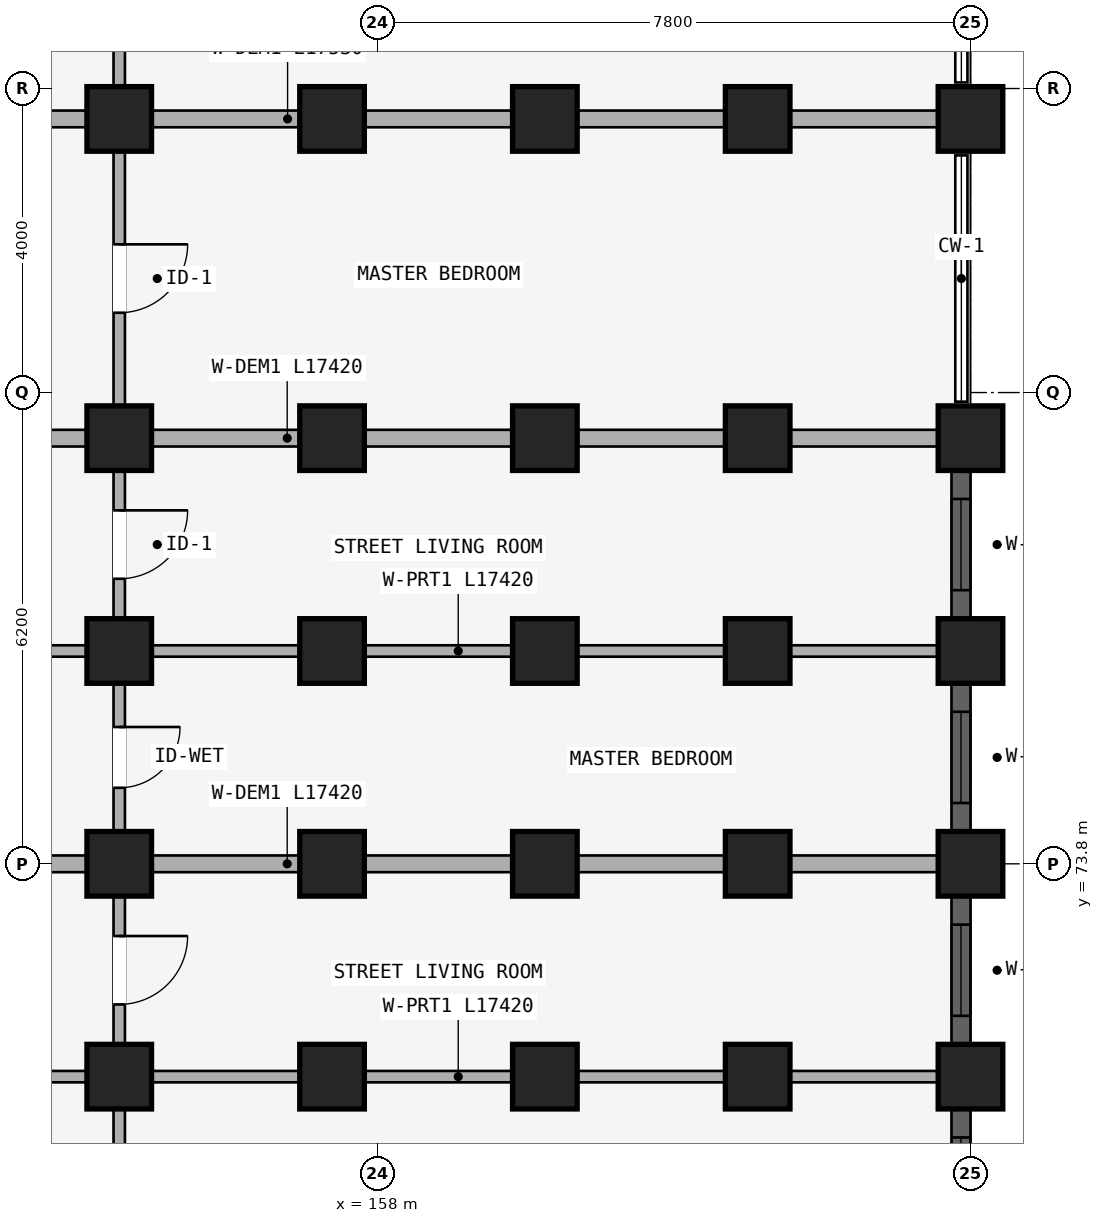
"""IFC4 building model, lengths in metres.
Left out: names, types, materials, properties, quantities, classifications, styles, units other than length and angle.
Written with IfcOpenShell. Run it as: python <this file> out.ifc"""

import sys

from ifc_helpers import new_model, si_unit, direction, frame, frame_2d, origin, origin_2d, place, context, subcontext, project, spatial, rectangle, extrude, element, fill, save


model = new_model("IFC4")
c1 = context("Model", 3, precision=1e-05, world=origin(), true_north=direction((0.0, 1.0)))
c2 = subcontext(c1, "Body", "Model", "MODEL_VIEW")
j1 = project(units=[si_unit("LENGTHUNIT", "METRE"), si_unit("PLANEANGLEUNIT", "RADIAN")], contexts=[c1])
p1 = place(None, origin())
s1 = spatial("IfcSite", under=j1, at=p1, CompositionType="ELEMENT")
p2 = place(p1, origin())
s2 = spatial("IfcBuilding", under=s1, at=p2, CompositionType="ELEMENT")
p3 = place(p2, frame((0.0, 0.0, 4.5)))
s3 = spatial("IfcBuildingStorey", under=s2, at=p3, CompositionType="ELEMENT", Elevation=4.5)
for number, where, z_axis, x_axis in (
    (1, (154.6, 83.6, 0.0), (0.0, 0.0, 1.0), (1.0, 0.0, 0.0)),
    (2, (157.4, 83.6, 0.0), (0.0, 0.0, 1.0), (1.0, 0.0, 0.0)),
    (3, (160.2, 83.6, 0.0), (0.0, 0.0, 1.0), (1.0, 0.0, 0.0)),
    (4, (163.0, 83.6, 0.0), (0.0, 0.0, 1.0), (1.0, 0.0, 0.0)),
    (5, (165.8, 83.6, 0.0), (0.0, 0.0, 1.0), (1.0, 0.0, 0.0)),
    (6, (154.6, 79.4, 0.0), (0.0, 0.0, 1.0), (1.0, 0.0, 0.0)),
    (7, (157.4, 79.4, 0.0), (0.0, 0.0, 1.0), (1.0, 0.0, 0.0)),
    (8, (160.2, 79.4, 0.0), (0.0, 0.0, 1.0), (1.0, 0.0, 0.0)),
    (9, (163.0, 79.4, 0.0), (0.0, 0.0, 1.0), (1.0, 0.0, 0.0)),
    (10, (165.8, 79.4, 0.0), (0.0, 0.0, 1.0), (1.0, 0.0, 0.0)),
    (11, (154.6, 76.6, 0.0), (0.0, 0.0, 1.0), (1.0, 0.0, 0.0)),
    (12, (157.4, 76.6, 0.0), (0.0, 0.0, 1.0), (1.0, 0.0, 0.0)),
    (13, (160.2, 76.6, 0.0), (0.0, 0.0, 1.0), (1.0, 0.0, 0.0)),
    (14, (163.0, 76.6, 0.0), (0.0, 0.0, 1.0), (1.0, 0.0, 0.0)),
    (15, (165.8, 76.6, 0.0), (0.0, 0.0, 1.0), (1.0, 0.0, 0.0)),
    (16, (154.6, 73.8, 0.0), (0.0, 0.0, 1.0), (1.0, 0.0, 0.0)),
    (17, (157.4, 73.8, 0.0), (0.0, 0.0, 1.0), (1.0, 0.0, 0.0)),
    (18, (160.2, 73.8, 0.0), (0.0, 0.0, 1.0), (1.0, 0.0, 0.0)),
    (19, (163.0, 73.8, 0.0), (0.0, 0.0, 1.0), (1.0, 0.0, 0.0)),
    (20, (165.8, 73.8, 0.0), (0.0, 0.0, 1.0), (1.0, 0.0, 0.0)),
    (21, (154.6, 71.0, 0.0), (0.0, 0.0, 1.0), (1.0, 0.0, 0.0)),
    (22, (157.4, 71.0, 0.0), (0.0, 0.0, 1.0), (1.0, 0.0, 0.0)),
    (23, (160.2, 71.0, 0.0), (0.0, 0.0, 1.0), (1.0, 0.0, 0.0)),
    (24, (163.0, 71.0, 0.0), (0.0, 0.0, 1.0), (1.0, 0.0, 0.0)),
    (25, (165.8, 71.0, 0.0), (0.0, 0.0, 1.0), (1.0, 0.0, 0.0)),
):
    element("IfcColumn", number, at=place(p3, frame(where, z_axis=z_axis, x_axis=x_axis)), inside=s3, PredefinedType="COLUMN", context=c2, shape_type="SweptSolid", body=[
        extrude(rectangle(XDim=0.85, YDim=0.85, at=origin_2d()), origin(), (0.0, 0.0, 1.0), 3.98),
    ])
p4 = place(p3, frame((154.6, 87.57, 0.0), z_axis=(0.0, 0.0, 1.0), x_axis=(0.0, -1.0, 0.0)))
e26 = element("IfcWall", 26, at=p4, inside=s3, PredefinedType="PARTITIONING", context=c2, shape_type="SweptSolid", body=[
    extrude(rectangle(XDim=3.89, YDim=0.15, at=frame_2d((1.945, 0.0))), origin(), (0.0, 0.0, 1.0), 3.322),
])
p5 = place(p4, frame((1.495, 0.0, 0.0)))
e27 = element("IfcOpeningElement", 27, at=p5, cuts=e26, PredefinedType="OPENING", context=c2, shape_type="SweptSolid", body=[
    extrude(rectangle(XDim=0.9, YDim=2.1, at=frame_2d((0.45, 1.05))), frame((0.0, 0.085, 0.0), z_axis=(0.0, -1.0, 0.0), x_axis=(1.0, 0.0, 0.0)), (0.0, 0.0, 1.0), 0.17),
])
p6 = place(p3, frame((154.6, 83.52, 0.0), z_axis=(0.0, 0.0, 1.0), x_axis=(0.0, -1.0, 0.0)))
e28 = element("IfcWall", 28, at=p6, inside=s3, PredefinedType="PARTITIONING", context=c2, shape_type="SweptSolid", body=[
    extrude(rectangle(XDim=4.04, YDim=0.15, at=frame_2d((2.02, 0.0))), origin(), (0.0, 0.0, 1.0), 3.322),
])
p7 = place(p6, frame((1.57, 0.0, 0.0)))
e29 = element("IfcOpeningElement", 29, at=p7, cuts=e28, PredefinedType="OPENING", context=c2, shape_type="SweptSolid", body=[
    extrude(rectangle(XDim=0.9, YDim=2.1, at=frame_2d((0.45, 1.05))), frame((0.0, 0.085, 0.0), z_axis=(0.0, -1.0, 0.0), x_axis=(1.0, 0.0, 0.0)), (0.0, 0.0, 1.0), 0.17),
])
p8 = place(p3, frame((148.05, 83.6, 0.0), z_axis=(0.0, 0.0, 1.0), x_axis=(1.0, 0.0, 0.0)))
e30 = element("IfcWall", 30, at=p8, inside=s3, PredefinedType="STANDARD", context=c2, shape_type="SweptSolid", body=[
    extrude(rectangle(XDim=17.53, YDim=0.22, at=frame_2d((8.765, 0.0))), origin(), (0.0, 0.0, 1.0), 3.322),
])
p9 = place(p3, frame((154.6, 79.32, 0.0), z_axis=(0.0, 0.0, 1.0), x_axis=(0.0, -1.0, 0.0)))
e31 = element("IfcWall", 31, at=p9, inside=s3, PredefinedType="PLUMBINGWALL", context=c2, shape_type="SweptSolid", body=[
    extrude(rectangle(XDim=2.64, YDim=0.15, at=frame_2d((1.32, 0.0))), origin(), (0.0, 0.0, 1.0), 3.322),
])
p10 = place(p9, frame((0.87, 0.0, 0.0)))
e32 = element("IfcOpeningElement", 32, at=p10, cuts=e31, PredefinedType="OPENING", context=c2, shape_type="SweptSolid", body=[
    extrude(rectangle(XDim=0.9, YDim=2.1, at=frame_2d((0.45, 1.05))), frame((0.0, 0.085, 0.0), z_axis=(0.0, -1.0, 0.0), x_axis=(1.0, 0.0, 0.0)), (0.0, 0.0, 1.0), 0.17),
])
p11 = place(p3, frame((148.1, 79.4, 0.0), z_axis=(0.0, 0.0, 1.0), x_axis=(1.0, 0.0, 0.0)))
e33 = element("IfcWall", 33, at=p11, inside=s3, PredefinedType="STANDARD", context=c2, shape_type="SweptSolid", body=[
    extrude(rectangle(XDim=17.42, YDim=0.22, at=frame_2d((8.71, 0.0))), origin(), (0.0, 0.0, 1.0), 3.322),
])
p12 = place(p3, frame((154.6, 76.52, 0.0), z_axis=(0.0, 0.0, 1.0), x_axis=(0.0, -1.0, 0.0)))
e34 = element("IfcWall", 34, at=p12, inside=s3, PredefinedType="PLUMBINGWALL", context=c2, shape_type="SweptSolid", body=[
    extrude(rectangle(XDim=2.64, YDim=0.15, at=frame_2d((1.32, 0.0))), origin(), (0.0, 0.0, 1.0), 3.322),
])
p13 = place(p12, frame((0.92, 0.0, 0.0)))
e35 = element("IfcOpeningElement", 35, at=p13, cuts=e34, PredefinedType="OPENING", context=c2, shape_type="SweptSolid", body=[
    extrude(rectangle(XDim=0.8, YDim=2.1, at=frame_2d((0.4, 1.05))), frame((0.0, 0.085, 0.0), z_axis=(0.0, -1.0, 0.0), x_axis=(1.0, 0.0, 0.0)), (0.0, 0.0, 1.0), 0.17),
])
p14 = place(p3, frame((148.1, 76.6, 0.0), z_axis=(0.0, 0.0, 1.0), x_axis=(1.0, 0.0, 0.0)))
e36 = element("IfcWall", 36, at=p14, inside=s3, PredefinedType="PARTITIONING", context=c2, shape_type="SweptSolid", body=[
    extrude(rectangle(XDim=17.42, YDim=0.15, at=frame_2d((8.71, 0.0))), origin(), (0.0, 0.0, 1.0), 3.322),
])
p15 = place(p14, frame((2.75, 0.0, 0.0)))
e37 = element("IfcOpeningElement", 37, at=p15, cuts=e36, PredefinedType="OPENING", context=c2, shape_type="SweptSolid", body=[
    extrude(rectangle(XDim=0.9, YDim=2.1, at=frame_2d((0.45, 1.05))), frame((0.0, 0.085, 0.0), z_axis=(0.0, -1.0, 0.0), x_axis=(1.0, 0.0, 0.0)), (0.0, 0.0, 1.0), 0.17),
])
p16 = place(p3, frame((154.6, 73.72, 0.0), z_axis=(0.0, 0.0, 1.0), x_axis=(0.0, -1.0, 0.0)))
e38 = element("IfcWall", 38, at=p16, inside=s3, PredefinedType="PLUMBINGWALL", context=c2, shape_type="SweptSolid", body=[
    extrude(rectangle(XDim=2.64, YDim=0.15, at=frame_2d((1.32, 0.0))), origin(), (0.0, 0.0, 1.0), 3.322),
])
p17 = place(p16, frame((0.87, 0.0, 0.0)))
e39 = element("IfcOpeningElement", 39, at=p17, cuts=e38, PredefinedType="OPENING", context=c2, shape_type="SweptSolid", body=[
    extrude(rectangle(XDim=0.9, YDim=2.1, at=frame_2d((0.45, 1.05))), frame((0.0, 0.085, 0.0), z_axis=(0.0, -1.0, 0.0), x_axis=(1.0, 0.0, 0.0)), (0.0, 0.0, 1.0), 0.17),
])
p18 = place(p3, frame((148.1, 73.8, 0.0), z_axis=(0.0, 0.0, 1.0), x_axis=(1.0, 0.0, 0.0)))
e40 = element("IfcWall", 40, at=p18, inside=s3, PredefinedType="STANDARD", context=c2, shape_type="SweptSolid", body=[
    extrude(rectangle(XDim=17.42, YDim=0.22, at=frame_2d((8.71, 0.0))), origin(), (0.0, 0.0, 1.0), 3.322),
])
p19 = place(p3, frame((154.6, 70.92, 0.0), z_axis=(0.0, 0.0, 1.0), x_axis=(0.0, -1.0, 0.0)))
e41 = element("IfcWall", 41, at=p19, inside=s3, PredefinedType="PLUMBINGWALL", context=c2, shape_type="SweptSolid", body=[
    extrude(rectangle(XDim=2.64, YDim=0.15, at=frame_2d((1.32, 0.0))), origin(), (0.0, 0.0, 1.0), 3.322),
])
p20 = place(p19, frame((0.92, 0.0, 0.0)))
e42 = element("IfcOpeningElement", 42, at=p20, cuts=e41, PredefinedType="OPENING", context=c2, shape_type="SweptSolid", body=[
    extrude(rectangle(XDim=0.8, YDim=2.1, at=frame_2d((0.4, 1.05))), frame((0.0, 0.085, 0.0), z_axis=(0.0, -1.0, 0.0), x_axis=(1.0, 0.0, 0.0)), (0.0, 0.0, 1.0), 0.17),
])
p21 = place(p3, frame((148.1, 71.0, 0.0), z_axis=(0.0, 0.0, 1.0), x_axis=(1.0, 0.0, 0.0)))
e43 = element("IfcWall", 43, at=p21, inside=s3, PredefinedType="PARTITIONING", context=c2, shape_type="SweptSolid", body=[
    extrude(rectangle(XDim=17.42, YDim=0.15, at=frame_2d((8.71, 0.0))), origin(), (0.0, 0.0, 1.0), 3.322),
])
p22 = place(p21, frame((2.75, 0.0, 0.0)))
e44 = element("IfcOpeningElement", 44, at=p22, cuts=e43, PredefinedType="OPENING", context=c2, shape_type="SweptSolid", body=[
    extrude(rectangle(XDim=0.9, YDim=2.1, at=frame_2d((0.45, 1.05))), frame((0.0, 0.085, 0.0), z_axis=(0.0, -1.0, 0.0), x_axis=(1.0, 0.0, 0.0)), (0.0, 0.0, 1.0), 0.17),
])
p23 = place(p3, frame((165.675, 78.98, 0.0), z_axis=(0.0, 0.0, 1.0), x_axis=(0.0, -1.0, 0.0)))
e45 = element("IfcWall", 45, at=p23, inside=s3, PredefinedType="STANDARD", context=c2, shape_type="SweptSolid", body=[
    extrude(rectangle(XDim=1.96, YDim=0.25, at=frame_2d((0.98, 0.0))), origin(), (0.0, 0.0, 1.0), 3.522),
])
p24 = place(p23, frame((0.38, 0.0, 0.88)))
e46 = element("IfcOpeningElement", 46, at=p24, cuts=e45, PredefinedType="OPENING", context=c2, shape_type="SweptSolid", body=[
    extrude(rectangle(XDim=1.2, YDim=1.5, at=frame_2d((0.6, 0.75))), frame((0.0, 0.135, 0.0), z_axis=(0.0, -1.0, 0.0), x_axis=(1.0, 0.0, 0.0)), (0.0, 0.0, 1.0), 0.27),
])
p25 = place(p3, frame((165.675, 76.18, 0.0), z_axis=(0.0, 0.0, 1.0), x_axis=(0.0, -1.0, 0.0)))
e47 = element("IfcWall", 47, at=p25, inside=s3, PredefinedType="STANDARD", context=c2, shape_type="SweptSolid", body=[
    extrude(rectangle(XDim=1.96, YDim=0.25, at=frame_2d((0.98, 0.0))), origin(), (0.0, 0.0, 1.0), 3.522),
])
p26 = place(p25, frame((0.38, 0.0, 0.88)))
e48 = element("IfcOpeningElement", 48, at=p26, cuts=e47, PredefinedType="OPENING", context=c2, shape_type="SweptSolid", body=[
    extrude(rectangle(XDim=1.2, YDim=1.5, at=frame_2d((0.6, 0.75))), frame((0.0, 0.135, 0.0), z_axis=(0.0, -1.0, 0.0), x_axis=(1.0, 0.0, 0.0)), (0.0, 0.0, 1.0), 0.27),
])
p27 = place(p3, frame((165.675, 73.38, 0.0), z_axis=(0.0, 0.0, 1.0), x_axis=(0.0, -1.0, 0.0)))
e49 = element("IfcWall", 49, at=p27, inside=s3, PredefinedType="STANDARD", context=c2, shape_type="SweptSolid", body=[
    extrude(rectangle(XDim=1.96, YDim=0.25, at=frame_2d((0.98, 0.0))), origin(), (0.0, 0.0, 1.0), 3.522),
])
p28 = place(p27, frame((0.38, 0.0, 0.88)))
e50 = element("IfcOpeningElement", 50, at=p28, cuts=e49, PredefinedType="OPENING", context=c2, shape_type="SweptSolid", body=[
    extrude(rectangle(XDim=1.2, YDim=1.5, at=frame_2d((0.6, 0.75))), frame((0.0, 0.135, 0.0), z_axis=(0.0, -1.0, 0.0), x_axis=(1.0, 0.0, 0.0)), (0.0, 0.0, 1.0), 0.27),
])
p29 = place(p3, frame((165.675, 70.58, 0.0), z_axis=(0.0, 0.0, 1.0), x_axis=(0.0, -1.0, 0.0)))
e51 = element("IfcWall", 51, at=p29, inside=s3, PredefinedType="STANDARD", context=c2, shape_type="SweptSolid", body=[
    extrude(rectangle(XDim=1.96, YDim=0.25, at=frame_2d((0.98, 0.0))), origin(), (0.0, 0.0, 1.0), 3.522),
])
p30 = place(p29, frame((0.38, 0.0, 0.88)))
e52 = element("IfcOpeningElement", 52, at=p30, cuts=e51, PredefinedType="OPENING", context=c2, shape_type="SweptSolid", body=[
    extrude(rectangle(XDim=1.2, YDim=1.5, at=frame_2d((0.6, 0.75))), frame((0.0, 0.135, 0.0), z_axis=(0.0, -1.0, 0.0), x_axis=(1.0, 0.0, 0.0)), (0.0, 0.0, 1.0), 0.27),
])
p31 = place(p24, origin())
e53 = element("IfcWindow", 53, at=p31, inside=s3, PartitioningType="SINGLE_PANEL", PredefinedType="WINDOW", context=c2, shape_type="SweptSolid", body=[
    extrude(rectangle(XDim=1.2, YDim=1.5, at=frame_2d((0.6, 0.75))), frame((0.0, 0.03, 0.0), z_axis=(0.0, -1.0, 0.0), x_axis=(1.0, 0.0, 0.0)), (0.0, 0.0, 1.0), 0.06),
])
fill(e46, e53)
p32 = place(p26, origin())
e54 = element("IfcWindow", 54, at=p32, inside=s3, PartitioningType="SINGLE_PANEL", PredefinedType="WINDOW", context=c2, shape_type="SweptSolid", body=[
    extrude(rectangle(XDim=1.2, YDim=1.5, at=frame_2d((0.6, 0.75))), frame((0.0, 0.03, 0.0), z_axis=(0.0, -1.0, 0.0), x_axis=(1.0, 0.0, 0.0)), (0.0, 0.0, 1.0), 0.06),
])
fill(e48, e54)
p33 = place(p28, origin())
e55 = element("IfcWindow", 55, at=p33, inside=s3, PartitioningType="SINGLE_PANEL", PredefinedType="WINDOW", context=c2, shape_type="SweptSolid", body=[
    extrude(rectangle(XDim=1.2, YDim=1.5, at=frame_2d((0.6, 0.75))), frame((0.0, 0.03, 0.0), z_axis=(0.0, -1.0, 0.0), x_axis=(1.0, 0.0, 0.0)), (0.0, 0.0, 1.0), 0.06),
])
fill(e50, e55)
p34 = place(p30, origin())
e56 = element("IfcWindow", 56, at=p34, inside=s3, PartitioningType="SINGLE_PANEL", PredefinedType="WINDOW", context=c2, shape_type="SweptSolid", body=[
    extrude(rectangle(XDim=1.2, YDim=1.5, at=frame_2d((0.6, 0.75))), frame((0.0, 0.03, 0.0), z_axis=(0.0, -1.0, 0.0), x_axis=(1.0, 0.0, 0.0)), (0.0, 0.0, 1.0), 0.06),
])
fill(e52, e56)
p35 = place(p7, frame((0.9, 0.0, 0.0), z_axis=(0.0, 0.0, 1.0), x_axis=(-1.0, 0.0, 0.0)))
e57 = element("IfcDoor", 57, at=p35, inside=s3, OperationType="SINGLE_SWING_RIGHT", PredefinedType="DOOR", context=c2, shape_type="SweptSolid", body=[
    extrude(rectangle(XDim=0.9, YDim=2.1, at=frame_2d((0.45, 1.05))), frame((0.0, 0.025, 0.0), z_axis=(0.0, -1.0, 0.0), x_axis=(1.0, 0.0, 0.0)), (0.0, 0.0, 1.0), 0.05),
])
fill(e29, e57)
p36 = place(p10, frame((0.9, 0.0, 0.0), z_axis=(0.0, 0.0, 1.0), x_axis=(-1.0, 0.0, 0.0)))
e58 = element("IfcDoor", 58, at=p36, inside=s3, OperationType="SINGLE_SWING_RIGHT", PredefinedType="DOOR", context=c2, shape_type="SweptSolid", body=[
    extrude(rectangle(XDim=0.9, YDim=2.1, at=frame_2d((0.45, 1.05))), frame((0.0, 0.025, 0.0), z_axis=(0.0, -1.0, 0.0), x_axis=(1.0, 0.0, 0.0)), (0.0, 0.0, 1.0), 0.05),
])
fill(e32, e58)
p37 = place(p13, frame((0.8, 0.0, 0.0), z_axis=(0.0, 0.0, 1.0), x_axis=(-1.0, 0.0, 0.0)))
e59 = element("IfcDoor", 59, at=p37, inside=s3, OperationType="SINGLE_SWING_RIGHT", PredefinedType="DOOR", context=c2, shape_type="SweptSolid", body=[
    extrude(rectangle(XDim=0.8, YDim=2.1, at=frame_2d((0.4, 1.05))), frame((0.0, 0.025, 0.0), z_axis=(0.0, -1.0, 0.0), x_axis=(1.0, 0.0, 0.0)), (0.0, 0.0, 1.0), 0.05),
])
fill(e35, e59)
p38 = place(p17, frame((0.9, 0.0, 0.0), z_axis=(0.0, 0.0, 1.0), x_axis=(-1.0, 0.0, 0.0)))
e60 = element("IfcDoor", 60, at=p38, inside=s3, OperationType="SINGLE_SWING_RIGHT", PredefinedType="DOOR", context=c2, shape_type="SweptSolid", body=[
    extrude(rectangle(XDim=0.9, YDim=2.1, at=frame_2d((0.45, 1.05))), frame((0.0, 0.025, 0.0), z_axis=(0.0, -1.0, 0.0), x_axis=(1.0, 0.0, 0.0)), (0.0, 0.0, 1.0), 0.05),
])
fill(e39, e60)
save(model, sys.argv[1])
